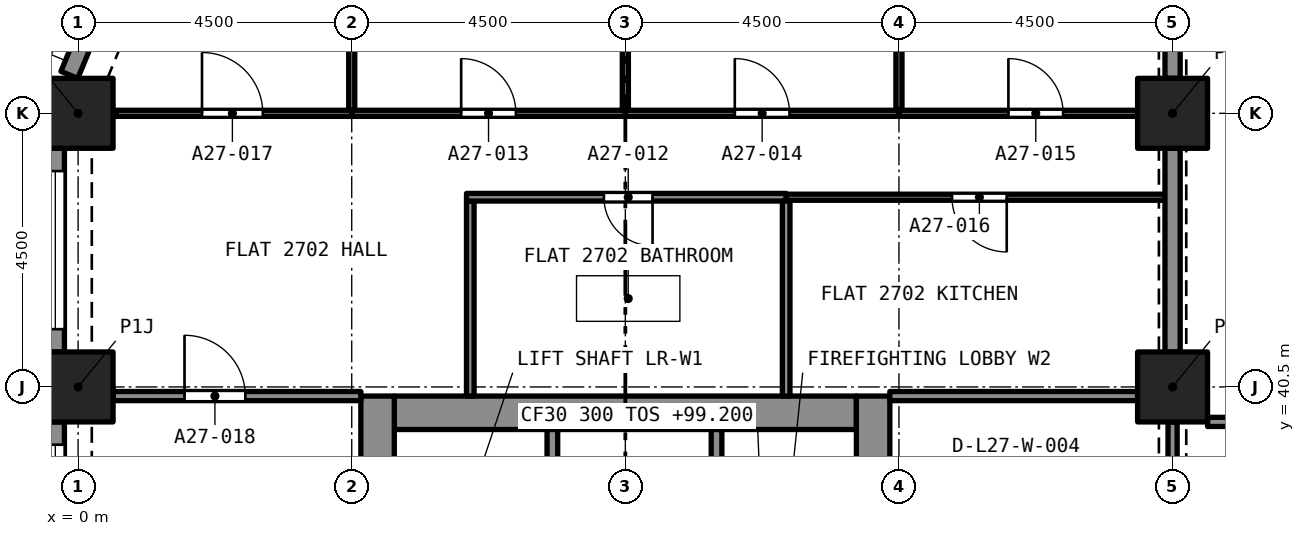
"""IFC4 building model, lengths in metres.
Left out: names, types, materials, properties, quantities, classifications, styles, units other than length and angle.
Written with IfcOpenShell. Run it as: python <this file> out.ifc"""

import sys

from ifc_helpers import new_model, si_unit, direction, frame, frame_2d, origin, origin_2d, place, context, subcontext, project, spatial, rectangle, extrude, element, fill, save


model = new_model("IFC4")
c1 = context("Model", 3, precision=1e-05, world=origin(), true_north=direction((0.0, 1.0)))
c2 = subcontext(c1, "Body", "Model", "MODEL_VIEW")
j1 = project(units=[si_unit("LENGTHUNIT", "METRE"), si_unit("PLANEANGLEUNIT", "RADIAN")], contexts=[c1])
p1 = place(None, origin())
s1 = spatial("IfcSite", under=j1, at=p1, CompositionType="ELEMENT")
p2 = place(p1, origin())
s2 = spatial("IfcBuilding", under=s1, at=p2, CompositionType="ELEMENT")
p3 = place(p2, frame((0.0, 0.0, 99.2)))
s3 = spatial("IfcBuildingStorey", under=s2, at=p3, CompositionType="ELEMENT", Elevation=99.2)
for number, where, z_axis, x_axis in (
    (1, (0.0, 40.5, 0.0), (0.0, 0.0, 1.0), (1.0, 0.0, 0.0)),
    (2, (18.0, 40.5, 0.0), (0.0, 0.0, 1.0), (1.0, 0.0, 0.0)),
    (3, (0.0, 45.0, 0.0), (0.0, 0.0, 1.0), (1.0, 0.0, 0.0)),
    (4, (18.0, 45.0, 0.0), (0.0, 0.0, 1.0), (1.0, 0.0, 0.0)),
):
    element("IfcColumn", number, at=place(p3, frame(where, z_axis=z_axis, x_axis=x_axis)), inside=s3, PredefinedType="COLUMN", context=c2, shape_type="SweptSolid", body=[
        extrude(rectangle(XDim=1.15, YDim=1.15, at=origin_2d()), origin(), (0.0, 0.0, 1.0), 3.2),
    ])
p4 = place(p3, frame((5.2, 40.075, 0.0), z_axis=(0.0, 0.0, 1.0), x_axis=(1.0, 0.0, 0.0)))
e5 = element("IfcWall", 5, at=p4, inside=s3, PredefinedType="SOLIDWALL", context=c2, shape_type="SweptSolid", body=[
    extrude(rectangle(XDim=7.6, YDim=0.55, at=frame_2d((3.8, 0.0))), origin(), (0.0, 0.0, 1.0), 3.2),
])
p5 = place(p3, frame((4.925, 27.15, 0.0), z_axis=(0.0, 0.0, 1.0), x_axis=(0.0, 1.0, 0.0)))
e6 = element("IfcWall", 6, at=p5, inside=s3, PredefinedType="SOLIDWALL", context=c2, shape_type="SweptSolid", body=[
    extrude(rectangle(XDim=13.2, YDim=0.55, at=frame_2d((6.6, 0.0))), origin(), (0.0, 0.0, 1.0), 3.2),
])
p6 = place(p5, frame((8.8, 0.0, 0.0)))
e7 = element("IfcOpeningElement", 7, at=p6, cuts=e6, PredefinedType="OPENING", context=c2, shape_type="SweptSolid", body=[
    extrude(rectangle(XDim=1.2, YDim=2.1, at=frame_2d((0.6, 1.05))), frame((0.0, 0.285, 0.0), z_axis=(0.0, -1.0, 0.0), x_axis=(1.0, 0.0, 0.0)), (0.0, 0.0, 1.0), 0.57),
])
p7 = place(p3, frame((13.075, 27.15, 0.0), z_axis=(0.0, 0.0, 1.0), x_axis=(0.0, 1.0, 0.0)))
e8 = element("IfcWall", 8, at=p7, inside=s3, PredefinedType="SOLIDWALL", context=c2, shape_type="SweptSolid", body=[
    extrude(rectangle(XDim=13.2, YDim=0.55, at=frame_2d((6.6, 0.0))), origin(), (0.0, 0.0, 1.0), 3.2),
])
p8 = place(p7, frame((10.95, 0.0, 0.0)))
e9 = element("IfcOpeningElement", 9, at=p8, cuts=e8, PredefinedType="OPENING", context=c2, shape_type="SweptSolid", body=[
    extrude(rectangle(XDim=1.1, YDim=2.1, at=frame_2d((0.55, 1.05))), frame((0.0, 0.285, 0.0), z_axis=(0.0, -1.0, 0.0), x_axis=(1.0, 0.0, 0.0)), (0.0, 0.0, 1.0), 0.57),
])
p9 = place(p7, frame((8.8, 0.0, 0.0)))
e10 = element("IfcOpeningElement", 10, at=p9, cuts=e8, PredefinedType="OPENING", context=c2, shape_type="SweptSolid", body=[
    extrude(rectangle(XDim=1.2, YDim=2.1, at=frame_2d((0.6, 1.05))), frame((0.0, 0.285, 0.0), z_axis=(0.0, -1.0, 0.0), x_axis=(1.0, 0.0, 0.0)), (0.0, 0.0, 1.0), 0.57),
])
p10 = place(p3, frame((-0.144, 45.632, 0.0), z_axis=(0.0, 0.0, 1.0), x_axis=(0.382723818695, 0.923862802911, 0.0)))
e11 = element("IfcWall", 11, at=p10, inside=s3, PredefinedType="SOLIDWALL", context=c2, shape_type="SweptSolid", body=[
    extrude(rectangle(XDim=2.164, YDim=0.3, at=frame_2d((1.082, 0.0))), origin(), (0.0, 0.0, 1.0), 3.2),
])
p11 = place(p10, frame((0.493, 0.0, 0.45)))
e12 = element("IfcOpeningElement", 12, at=p11, cuts=e11, PredefinedType="OPENING", context=c2, shape_type="SweptSolid", body=[
    extrude(rectangle(XDim=1.4, YDim=1.95, at=frame_2d((0.7, 0.975))), frame((0.0, 0.16, 0.0), z_axis=(0.0, -1.0, 0.0), x_axis=(1.0, 0.0, 0.0)), (0.0, 0.0, 1.0), 0.32),
])
p12 = place(p3, frame((-0.375, 41.075, 0.0), z_axis=(0.0, 0.0, 1.0), x_axis=(0.0, 1.0, 0.0)))
e13 = element("IfcWall", 13, at=p12, inside=s3, PredefinedType="SOLIDWALL", context=c2, shape_type="SweptSolid", body=[
    extrude(rectangle(XDim=3.35, YDim=0.3, at=frame_2d((1.675, 0.0))), origin(), (0.0, 0.0, 1.0), 3.2),
])
p13 = place(p12, frame((0.375, 0.0, 0.45)))
e14 = element("IfcOpeningElement", 14, at=p13, cuts=e13, PredefinedType="OPENING", context=c2, shape_type="SweptSolid", body=[
    extrude(rectangle(XDim=2.6, YDim=1.95, at=frame_2d((1.3, 0.975))), frame((0.0, 0.16, 0.0), z_axis=(0.0, -1.0, 0.0), x_axis=(1.0, 0.0, 0.0)), (0.0, 0.0, 1.0), 0.32),
])
p14 = place(p3, frame((-0.375, 36.575, 0.0), z_axis=(0.0, 0.0, 1.0), x_axis=(0.0, 1.0, 0.0)))
e15 = element("IfcWall", 15, at=p14, inside=s3, PredefinedType="SOLIDWALL", context=c2, shape_type="SweptSolid", body=[
    extrude(rectangle(XDim=3.35, YDim=0.3, at=frame_2d((1.675, 0.0))), origin(), (0.0, 0.0, 1.0), 3.2),
])
p15 = place(p14, frame((0.375, 0.0, 0.45)))
e16 = element("IfcOpeningElement", 16, at=p15, cuts=e15, PredefinedType="OPENING", context=c2, shape_type="SweptSolid", body=[
    extrude(rectangle(XDim=2.6, YDim=1.95, at=frame_2d((1.3, 0.975))), frame((0.0, 0.16, 0.0), z_axis=(0.0, -1.0, 0.0), x_axis=(1.0, 0.0, 0.0)), (0.0, 0.0, 1.0), 0.32),
])
p16 = place(p3, frame((6.45, 40.35, 0.0), z_axis=(0.0, 0.0, 1.0), x_axis=(0.0, 1.0, 0.0)))
e17 = element("IfcWall", 17, at=p16, inside=s3, PredefinedType="PARTITIONING", context=c2, shape_type="SweptSolid", body=[
    extrude(rectangle(XDim=3.208, YDim=0.125, at=frame_2d((1.604, 0.0))), origin(), (0.0, 0.0, 1.0), 2.9),
])
p17 = place(p3, frame((11.645, 43.62, 0.0), z_axis=(0.0, 0.0, 1.0), x_axis=(-1.0, 0.0, 0.0)))
e18 = element("IfcWall", 18, at=p17, inside=s3, PredefinedType="PARTITIONING", context=c2, shape_type="SweptSolid", body=[
    extrude(rectangle(XDim=5.258, YDim=0.125, at=frame_2d((2.629, 0.0))), origin(), (0.0, 0.0, 1.0), 2.9),
])
p18 = place(p17, frame((2.198, 0.0, 0.0)))
e19 = element("IfcOpeningElement", 19, at=p18, cuts=e18, PredefinedType="OPENING", context=c2, shape_type="SweptSolid", body=[
    extrude(rectangle(XDim=0.8, YDim=2.1, at=frame_2d((0.4, 1.05))), frame((0.0, 0.073, 0.0), z_axis=(0.0, -1.0, 0.0), x_axis=(1.0, 0.0, 0.0)), (0.0, 0.0, 1.0), 0.145),
])
p19 = place(p3, frame((11.645, 40.35, 0.0), z_axis=(0.0, 0.0, 1.0), x_axis=(0.0, 1.0, 0.0)))
e20 = element("IfcWall", 20, at=p19, inside=s3, PredefinedType="PARTITIONING", context=c2, shape_type="SweptSolid", body=[
    extrude(rectangle(XDim=3.208, YDim=0.125, at=frame_2d((1.604, 0.0))), origin(), (0.0, 0.0, 1.0), 2.9),
])
p20 = place(p3, frame((9.0, 45.05, 0.0), z_axis=(0.0, 0.0, 1.0), x_axis=(0.0, 1.0, 0.0)))
e21 = element("IfcWall", 21, at=p20, inside=s3, PredefinedType="PARTITIONING", context=c2, shape_type="SweptSolid", body=[
    extrude(rectangle(XDim=3.875, YDim=0.1, at=frame_2d((1.938, 0.0))), origin(), (0.0, 0.0, 1.0), 2.9),
])
p21 = place(p3, frame((4.5, 45.0, 0.0), z_axis=(0.0, 0.0, 1.0), x_axis=(1.0, 0.0, 0.0)))
e22 = element("IfcWall", 22, at=p21, inside=s3, PredefinedType="PARTITIONING", context=c2, shape_type="SweptSolid", body=[
    extrude(rectangle(XDim=4.5, YDim=0.1, at=frame_2d((2.25, 0.0))), origin(), (0.0, 0.0, 1.0), 2.9),
])
p22 = place(p21, frame((1.8, 0.0, 0.0)))
e23 = element("IfcOpeningElement", 23, at=p22, cuts=e22, PredefinedType="OPENING", context=c2, shape_type="SweptSolid", body=[
    extrude(rectangle(XDim=0.9, YDim=2.1, at=frame_2d((0.45, 1.05))), frame((0.0, 0.06, 0.0), z_axis=(0.0, -1.0, 0.0), x_axis=(1.0, 0.0, 0.0)), (0.0, 0.0, 1.0), 0.12),
])
p23 = place(p3, frame((4.5, 45.05, 0.0), z_axis=(0.0, 0.0, 1.0), x_axis=(0.0, 1.0, 0.0)))
e24 = element("IfcWall", 24, at=p23, inside=s3, PredefinedType="PARTITIONING", context=c2, shape_type="SweptSolid", body=[
    extrude(rectangle(XDim=3.828, YDim=0.1, at=frame_2d((1.914, 0.0))), origin(), (0.0, 0.0, 1.0), 2.9),
])
p24 = place(p3, frame((13.5, 45.05, 0.0), z_axis=(0.0, 0.0, 1.0), x_axis=(0.0, 1.0, 0.0)))
e25 = element("IfcWall", 25, at=p24, inside=s3, PredefinedType="PARTITIONING", context=c2, shape_type="SweptSolid", body=[
    extrude(rectangle(XDim=3.875, YDim=0.1, at=frame_2d((1.938, 0.0))), origin(), (0.0, 0.0, 1.0), 2.9),
])
p25 = place(p3, frame((9.0, 45.0, 0.0), z_axis=(0.0, 0.0, 1.0), x_axis=(1.0, 0.0, 0.0)))
e26 = element("IfcWall", 26, at=p25, inside=s3, PredefinedType="PARTITIONING", context=c2, shape_type="SweptSolid", body=[
    extrude(rectangle(XDim=4.5, YDim=0.1, at=frame_2d((2.25, 0.0))), origin(), (0.0, 0.0, 1.0), 2.9),
])
p26 = place(p25, frame((1.8, 0.0, 0.0)))
e27 = element("IfcOpeningElement", 27, at=p26, cuts=e26, PredefinedType="OPENING", context=c2, shape_type="SweptSolid", body=[
    extrude(rectangle(XDim=0.9, YDim=2.1, at=frame_2d((0.45, 1.05))), frame((0.0, 0.06, 0.0), z_axis=(0.0, -1.0, 0.0), x_axis=(1.0, 0.0, 0.0)), (0.0, 0.0, 1.0), 0.12),
])
p27 = place(p3, frame((13.5, 45.0, 0.0), z_axis=(0.0, 0.0, 1.0), x_axis=(1.0, 0.0, 0.0)))
e28 = element("IfcWall", 28, at=p27, inside=s3, PredefinedType="PARTITIONING", context=c2, shape_type="SweptSolid", body=[
    extrude(rectangle(XDim=3.925, YDim=0.1, at=frame_2d((1.962, 0.0))), origin(), (0.0, 0.0, 1.0), 2.9),
])
p28 = place(p27, frame((1.8, 0.0, 0.0)))
e29 = element("IfcOpeningElement", 29, at=p28, cuts=e28, PredefinedType="OPENING", context=c2, shape_type="SweptSolid", body=[
    extrude(rectangle(XDim=0.9, YDim=2.1, at=frame_2d((0.45, 1.05))), frame((0.0, 0.06, 0.0), z_axis=(0.0, -1.0, 0.0), x_axis=(1.0, 0.0, 0.0)), (0.0, 0.0, 1.0), 0.12),
])
p29 = place(p3, frame((18.0, 45.575, 0.0), z_axis=(0.0, 0.0, 1.0), x_axis=(0.0, 1.0, 0.0)))
e30 = element("IfcWall", 30, at=p29, inside=s3, PredefinedType="PARTITIONING", context=c2, shape_type="SweptSolid", body=[
    extrude(rectangle(XDim=3.35, YDim=0.25, at=frame_2d((1.675, 0.0))), origin(), (0.0, 0.0, 1.0), 2.38),
])
p30 = place(p3, frame((17.875, 43.62, 0.0), z_axis=(0.0, 0.0, 1.0), x_axis=(-1.0, 0.0, 0.0)))
e31 = element("IfcWall", 31, at=p30, inside=s3, PredefinedType="PARTITIONING", context=c2, shape_type="SweptSolid", body=[
    extrude(rectangle(XDim=6.23, YDim=0.1, at=frame_2d((3.115, 0.0))), origin(), (0.0, 0.0, 1.0), 2.9),
])
p31 = place(p30, frame((2.602, 0.0, 0.0)))
e32 = element("IfcOpeningElement", 32, at=p31, cuts=e31, PredefinedType="OPENING", context=c2, shape_type="SweptSolid", body=[
    extrude(rectangle(XDim=0.9, YDim=2.1, at=frame_2d((0.45, 1.05))), frame((0.0, 0.06, 0.0), z_axis=(0.0, -1.0, 0.0), x_axis=(1.0, 0.0, 0.0)), (0.0, 0.0, 1.0), 0.12),
])
p32 = place(p3, frame((0.622, 45.0, 0.0), z_axis=(0.0, 0.0, 1.0), x_axis=(1.0, 0.0, 0.0)))
e33 = element("IfcWall", 33, at=p32, inside=s3, PredefinedType="PARTITIONING", context=c2, shape_type="SweptSolid", body=[
    extrude(rectangle(XDim=3.878, YDim=0.1, at=frame_2d((1.939, 0.0))), origin(), (0.0, 0.0, 1.0), 2.9),
])
p33 = place(p32, frame((1.415, 0.0, 0.0)))
e34 = element("IfcOpeningElement", 34, at=p33, cuts=e33, PredefinedType="OPENING", context=c2, shape_type="SweptSolid", body=[
    extrude(rectangle(XDim=1.0, YDim=2.1, at=frame_2d((0.5, 1.05))), frame((0.0, 0.06, 0.0), z_axis=(0.0, -1.0, 0.0), x_axis=(1.0, 0.0, 0.0)), (0.0, 0.0, 1.0), 0.12),
])
p34 = place(p3, frame((0.575, 40.35, 0.0), z_axis=(0.0, 0.0, 1.0), x_axis=(1.0, 0.0, 0.0)))
e35 = element("IfcWall", 35, at=p34, inside=s3, PredefinedType="PARTITIONING", context=c2, shape_type="SweptSolid", body=[
    extrude(rectangle(XDim=4.075, YDim=0.15, at=frame_2d((2.038, 0.0))), origin(), (0.0, 0.0, 1.0), 2.9),
])
p35 = place(p34, frame((1.175, 0.0, 0.0)))
e36 = element("IfcOpeningElement", 36, at=p35, cuts=e35, PredefinedType="OPENING", context=c2, shape_type="SweptSolid", body=[
    extrude(rectangle(XDim=1.0, YDim=2.1, at=frame_2d((0.5, 1.05))), frame((0.0, 0.085, 0.0), z_axis=(0.0, -1.0, 0.0), x_axis=(1.0, 0.0, 0.0)), (0.0, 0.0, 1.0), 0.17),
])
p36 = place(p3, frame((18.0, 41.075, 0.0), z_axis=(0.0, 0.0, 1.0), x_axis=(0.0, 1.0, 0.0)))
e37 = element("IfcWall", 37, at=p36, inside=s3, PredefinedType="PARTITIONING", context=c2, shape_type="SweptSolid", body=[
    extrude(rectangle(XDim=3.35, YDim=0.25, at=frame_2d((1.675, 0.0))), origin(), (0.0, 0.0, 1.0), 2.38),
])
p37 = place(p3, frame((13.35, 40.35, 0.0), z_axis=(0.0, 0.0, 1.0), x_axis=(1.0, 0.0, 0.0)))
e38 = element("IfcWall", 38, at=p37, inside=s3, PredefinedType="PARTITIONING", context=c2, shape_type="SweptSolid", body=[
    extrude(rectangle(XDim=4.075, YDim=0.15, at=frame_2d((2.038, 0.0))), origin(), (0.0, 0.0, 1.0), 2.9),
])
p38 = place(p3, frame((18.575, 39.925, 0.0), z_axis=(0.0, 0.0, 1.0), x_axis=(1.0, 0.0, 0.0)))
e39 = element("IfcWall", 39, at=p38, inside=s3, PredefinedType="PARTITIONING", context=c2, shape_type="SweptSolid", body=[
    extrude(rectangle(XDim=8.425, YDim=0.15, at=frame_2d((4.212, 0.0))), origin(), (0.0, 0.0, 1.0), 2.75),
])
p39 = place(p38, frame((3.425, 0.0, 0.0)))
e40 = element("IfcOpeningElement", 40, at=p39, cuts=e39, PredefinedType="OPENING", context=c2, shape_type="SweptSolid", body=[
    extrude(rectangle(XDim=1.0, YDim=2.1, at=frame_2d((0.5, 1.05))), frame((0.0, 0.085, 0.0), z_axis=(0.0, -1.0, 0.0), x_axis=(1.0, 0.0, 0.0)), (0.0, 0.0, 1.0), 0.17),
])
p40 = place(p3, frame((18.0, 39.925, 0.0), z_axis=(0.0, 0.0, 1.0), x_axis=(0.0, -1.0, 0.0)))
e41 = element("IfcWall", 41, at=p40, inside=s3, PredefinedType="PARTITIONING", context=c2, shape_type="SweptSolid", body=[
    extrude(rectangle(XDim=3.35, YDim=0.15, at=frame_2d((1.675, 0.0))), origin(), (0.0, 0.0, 1.0), 2.38),
])
p41 = place(p40, frame((1.075, 0.0, 0.0)))
e42 = element("IfcOpeningElement", 42, at=p41, cuts=e41, PredefinedType="OPENING", context=c2, shape_type="SweptSolid", body=[
    extrude(rectangle(XDim=1.2, YDim=2.1, at=frame_2d((0.6, 1.05))), frame((0.0, 0.085, 0.0), z_axis=(0.0, -1.0, 0.0), x_axis=(1.0, 0.0, 0.0)), (0.0, 0.0, 1.0), 0.17),
])
p42 = place(p3, frame((7.8, 37.5, 0.0), z_axis=(0.0, 0.0, 1.0), x_axis=(0.0, 1.0, 0.0)))
e43 = element("IfcWall", 43, at=p42, inside=s3, PredefinedType="SOLIDWALL", context=c2, shape_type="SweptSolid", body=[
    extrude(rectangle(XDim=2.3, YDim=0.175, at=frame_2d((1.15, 0.0))), origin(), (0.0, 0.0, 1.0), 2.9),
])
p43 = place(p3, frame((10.5, 37.5, 0.0), z_axis=(0.0, 0.0, 1.0), x_axis=(0.0, 1.0, 0.0)))
e44 = element("IfcWall", 44, at=p43, inside=s3, PredefinedType="SOLIDWALL", context=c2, shape_type="SweptSolid", body=[
    extrude(rectangle(XDim=2.3, YDim=0.175, at=frame_2d((1.15, 0.0))), origin(), (0.0, 0.0, 1.0), 2.9),
])
p44 = place(p43, frame((0.65, 0.0, 0.0)))
e45 = element("IfcOpeningElement", 45, at=p44, cuts=e44, PredefinedType="OPENING", context=c2, shape_type="SweptSolid", body=[
    extrude(rectangle(XDim=1.0, YDim=2.1, at=frame_2d((0.5, 1.05))), frame((0.0, 0.097, 0.0), z_axis=(0.0, -1.0, 0.0), x_axis=(1.0, 0.0, 0.0)), (0.0, 0.0, 1.0), 0.195),
])
p45 = place(p13, origin())
e46 = element("IfcWindow", 46, at=p45, inside=s3, PartitioningType="SINGLE_PANEL", PredefinedType="WINDOW", context=c2, shape_type="SweptSolid", body=[
    extrude(rectangle(XDim=2.6, YDim=1.95, at=frame_2d((1.3, 0.975))), frame((0.0, 0.03, 0.0), z_axis=(0.0, -1.0, 0.0), x_axis=(1.0, 0.0, 0.0)), (0.0, 0.0, 1.0), 0.06),
])
fill(e14, e46)
p46 = place(p15, origin())
e47 = element("IfcWindow", 47, at=p46, inside=s3, PartitioningType="SINGLE_PANEL", PredefinedType="WINDOW", context=c2, shape_type="SweptSolid", body=[
    extrude(rectangle(XDim=2.6, YDim=1.95, at=frame_2d((1.3, 0.975))), frame((0.0, 0.03, 0.0), z_axis=(0.0, -1.0, 0.0), x_axis=(1.0, 0.0, 0.0)), (0.0, 0.0, 1.0), 0.06),
])
fill(e16, e47)
p47 = place(p18, origin())
e48 = element("IfcDoor", 48, at=p47, inside=s3, OperationType="SINGLE_SWING_LEFT", PredefinedType="DOOR", context=c2, shape_type="SweptSolid", body=[
    extrude(rectangle(XDim=0.8, YDim=2.1, at=frame_2d((0.4, 1.05))), frame((0.0, 0.025, 0.0), z_axis=(0.0, -1.0, 0.0), x_axis=(1.0, 0.0, 0.0)), (0.0, 0.0, 1.0), 0.05),
])
fill(e19, e48)
p48 = place(p22, origin())
e49 = element("IfcDoor", 49, at=p48, inside=s3, OperationType="SINGLE_SWING_RIGHT", PredefinedType="DOOR", context=c2, shape_type="SweptSolid", body=[
    extrude(rectangle(XDim=0.9, YDim=2.1, at=frame_2d((0.45, 1.05))), frame((0.0, 0.025, 0.0), z_axis=(0.0, -1.0, 0.0), x_axis=(1.0, 0.0, 0.0)), (0.0, 0.0, 1.0), 0.05),
])
fill(e23, e49)
p49 = place(p26, origin())
e50 = element("IfcDoor", 50, at=p49, inside=s3, OperationType="SINGLE_SWING_LEFT", PredefinedType="DOOR", context=c2, shape_type="SweptSolid", body=[
    extrude(rectangle(XDim=0.9, YDim=2.1, at=frame_2d((0.45, 1.05))), frame((0.0, 0.025, 0.0), z_axis=(0.0, -1.0, 0.0), x_axis=(1.0, 0.0, 0.0)), (0.0, 0.0, 1.0), 0.05),
])
fill(e27, e50)
p50 = place(p28, origin())
e51 = element("IfcDoor", 51, at=p50, inside=s3, OperationType="SINGLE_SWING_RIGHT", PredefinedType="DOOR", context=c2, shape_type="SweptSolid", body=[
    extrude(rectangle(XDim=0.9, YDim=2.1, at=frame_2d((0.45, 1.05))), frame((0.0, 0.025, 0.0), z_axis=(0.0, -1.0, 0.0), x_axis=(1.0, 0.0, 0.0)), (0.0, 0.0, 1.0), 0.05),
])
fill(e29, e51)
p51 = place(p31, origin())
e52 = element("IfcDoor", 52, at=p51, inside=s3, OperationType="SINGLE_SWING_LEFT", PredefinedType="DOOR", context=c2, shape_type="SweptSolid", body=[
    extrude(rectangle(XDim=0.9, YDim=2.1, at=frame_2d((0.45, 1.05))), frame((0.0, 0.025, 0.0), z_axis=(0.0, -1.0, 0.0), x_axis=(1.0, 0.0, 0.0)), (0.0, 0.0, 1.0), 0.05),
])
fill(e32, e52)
p52 = place(p33, origin())
e53 = element("IfcDoor", 53, at=p52, inside=s3, OperationType="SINGLE_SWING_LEFT", PredefinedType="DOOR", context=c2, shape_type="SweptSolid", body=[
    extrude(rectangle(XDim=1.0, YDim=2.1, at=frame_2d((0.5, 1.05))), frame((0.0, 0.025, 0.0), z_axis=(0.0, -1.0, 0.0), x_axis=(1.0, 0.0, 0.0)), (0.0, 0.0, 1.0), 0.05),
])
fill(e34, e53)
p53 = place(p35, origin())
e54 = element("IfcDoor", 54, at=p53, inside=s3, OperationType="SINGLE_SWING_LEFT", PredefinedType="DOOR", context=c2, shape_type="SweptSolid", body=[
    extrude(rectangle(XDim=1.0, YDim=2.1, at=frame_2d((0.5, 1.05))), frame((0.0, 0.025, 0.0), z_axis=(0.0, -1.0, 0.0), x_axis=(1.0, 0.0, 0.0)), (0.0, 0.0, 1.0), 0.05),
])
fill(e36, e54)
save(model, sys.argv[1])
